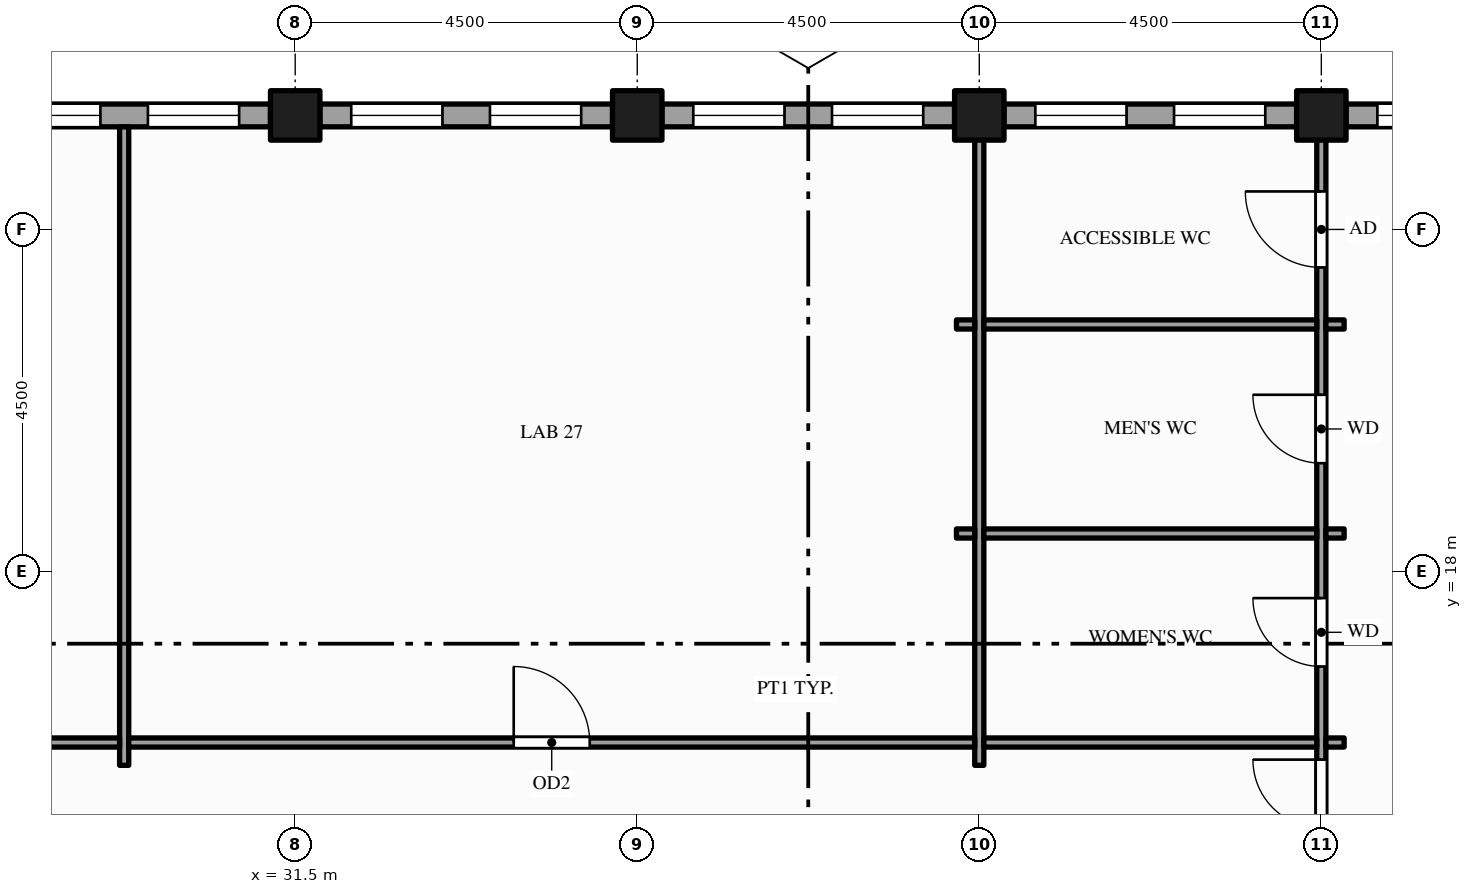
"""IFC4 building model, lengths in metres.
Left out: names, types, materials, properties, quantities, classifications, styles, units other than length and angle.
Written with IfcOpenShell. Run it as: python <this file> out.ifc"""

import sys

from ifc_helpers import new_model, si_unit, direction, frame, frame_2d, origin, origin_2d, place, context, subcontext, project, spatial, rectangle, hollow_rectangle, extrude, element, fill, save


model = new_model("IFC4")
c1 = context("Model", 3, precision=1e-05, world=origin(), true_north=direction((0.0, 1.0)))
c2 = subcontext(c1, "Body", "Model", "MODEL_VIEW")
j1 = project(units=[si_unit("LENGTHUNIT", "METRE"), si_unit("PLANEANGLEUNIT", "RADIAN")], contexts=[c1])
p1 = place(None, origin())
s1 = spatial("IfcSite", under=j1, at=p1, CompositionType="ELEMENT")
p2 = place(p1, origin())
s2 = spatial("IfcBuilding", under=s1, at=p2, CompositionType="ELEMENT")
p3 = place(p2, frame((0.0, 0.0, 285.0)))
s3 = spatial("IfcBuildingStorey", under=s2, at=p3, CompositionType="ELEMENT", Elevation=285.0)
for number, where, z_axis, x_axis in (
    (1, (31.5, 24.0, -0.15), (0.0, 0.0, 1.0), (1.0, 0.0, 0.0)),
    (2, (36.0, 24.0, -0.15), (0.0, 0.0, 1.0), (1.0, 0.0, 0.0)),
    (3, (40.5, 24.0, -0.15), (0.0, 0.0, 1.0), (1.0, 0.0, 0.0)),
    (4, (45.0, 24.0, -0.15), (0.0, 0.0, 1.0), (1.0, 0.0, 0.0)),
):
    element("IfcColumn", number, at=place(p3, frame(where, z_axis=z_axis, x_axis=x_axis)), inside=s3, PredefinedType="COLUMN", context=c2, shape_type="SweptSolid", body=[
        extrude(hollow_rectangle(XDim=0.65, YDim=0.65, WallThickness=0.032, at=origin_2d()), origin(), (0.0, 0.0, 1.0), 4.0),
    ])
p4 = place(p3, frame((49.175, 24.0, 0.0), z_axis=(0.0, 0.0, 1.0), x_axis=(-1.0, 0.0, 0.0)))
e5 = element("IfcWall", 5, at=p4, inside=s3, PredefinedType="STANDARD", context=c2, shape_type="SweptSolid", body=[
    extrude(rectangle(XDim=3.85, YDim=0.3, at=frame_2d((1.925, 0.0))), origin(), (0.0, 0.0, 1.0), 2.87),
])
p5 = place(p4, frame((0.413, 0.0, 0.9)))
e6 = element("IfcOpeningElement", 6, at=p5, cuts=e5, PredefinedType="OPENING", context=c2, shape_type="SweptSolid", body=[
    extrude(rectangle(XDim=1.2, YDim=1.75, at=frame_2d((0.6, 0.875))), frame((0.0, 0.16, 0.0), z_axis=(0.0, -1.0, 0.0), x_axis=(1.0, 0.0, 0.0)), (0.0, 0.0, 1.0), 0.32),
])
p6 = place(p4, frame((2.238, 0.0, 0.9)))
e7 = element("IfcOpeningElement", 7, at=p6, cuts=e5, PredefinedType="OPENING", context=c2, shape_type="SweptSolid", body=[
    extrude(rectangle(XDim=1.2, YDim=1.75, at=frame_2d((0.6, 0.875))), frame((0.0, 0.16, 0.0), z_axis=(0.0, -1.0, 0.0), x_axis=(1.0, 0.0, 0.0)), (0.0, 0.0, 1.0), 0.32),
])
p7 = place(p3, frame((44.675, 24.0, 0.0), z_axis=(0.0, 0.0, 1.0), x_axis=(-1.0, 0.0, 0.0)))
e8 = element("IfcWall", 8, at=p7, inside=s3, PredefinedType="STANDARD", context=c2, shape_type="SweptSolid", body=[
    extrude(rectangle(XDim=3.85, YDim=0.3, at=frame_2d((1.925, 0.0))), origin(), (0.0, 0.0, 1.0), 2.87),
])
p8 = place(p7, frame((0.413, 0.0, 0.9)))
e9 = element("IfcOpeningElement", 9, at=p8, cuts=e8, PredefinedType="OPENING", context=c2, shape_type="SweptSolid", body=[
    extrude(rectangle(XDim=1.2, YDim=1.75, at=frame_2d((0.6, 0.875))), frame((0.0, 0.16, 0.0), z_axis=(0.0, -1.0, 0.0), x_axis=(1.0, 0.0, 0.0)), (0.0, 0.0, 1.0), 0.32),
])
p9 = place(p7, frame((2.238, 0.0, 0.9)))
e10 = element("IfcOpeningElement", 10, at=p9, cuts=e8, PredefinedType="OPENING", context=c2, shape_type="SweptSolid", body=[
    extrude(rectangle(XDim=1.2, YDim=1.75, at=frame_2d((0.6, 0.875))), frame((0.0, 0.16, 0.0), z_axis=(0.0, -1.0, 0.0), x_axis=(1.0, 0.0, 0.0)), (0.0, 0.0, 1.0), 0.32),
])
p10 = place(p3, frame((40.175, 24.0, 0.0), z_axis=(0.0, 0.0, 1.0), x_axis=(-1.0, 0.0, 0.0)))
e11 = element("IfcWall", 11, at=p10, inside=s3, PredefinedType="STANDARD", context=c2, shape_type="SweptSolid", body=[
    extrude(rectangle(XDim=3.85, YDim=0.3, at=frame_2d((1.925, 0.0))), origin(), (0.0, 0.0, 1.0), 2.87),
])
p11 = place(p10, frame((0.413, 0.0, 0.9)))
e12 = element("IfcOpeningElement", 12, at=p11, cuts=e11, PredefinedType="OPENING", context=c2, shape_type="SweptSolid", body=[
    extrude(rectangle(XDim=1.2, YDim=1.75, at=frame_2d((0.6, 0.875))), frame((0.0, 0.16, 0.0), z_axis=(0.0, -1.0, 0.0), x_axis=(1.0, 0.0, 0.0)), (0.0, 0.0, 1.0), 0.32),
])
p12 = place(p10, frame((2.238, 0.0, 0.9)))
e13 = element("IfcOpeningElement", 13, at=p12, cuts=e11, PredefinedType="OPENING", context=c2, shape_type="SweptSolid", body=[
    extrude(rectangle(XDim=1.2, YDim=1.75, at=frame_2d((0.6, 0.875))), frame((0.0, 0.16, 0.0), z_axis=(0.0, -1.0, 0.0), x_axis=(1.0, 0.0, 0.0)), (0.0, 0.0, 1.0), 0.32),
])
p13 = place(p3, frame((35.675, 24.0, 0.0), z_axis=(0.0, 0.0, 1.0), x_axis=(-1.0, 0.0, 0.0)))
e14 = element("IfcWall", 14, at=p13, inside=s3, PredefinedType="STANDARD", context=c2, shape_type="SweptSolid", body=[
    extrude(rectangle(XDim=3.85, YDim=0.3, at=frame_2d((1.925, 0.0))), origin(), (0.0, 0.0, 1.0), 2.87),
])
p14 = place(p13, frame((0.413, 0.0, 0.9)))
e15 = element("IfcOpeningElement", 15, at=p14, cuts=e14, PredefinedType="OPENING", context=c2, shape_type="SweptSolid", body=[
    extrude(rectangle(XDim=1.2, YDim=1.75, at=frame_2d((0.6, 0.875))), frame((0.0, 0.16, 0.0), z_axis=(0.0, -1.0, 0.0), x_axis=(1.0, 0.0, 0.0)), (0.0, 0.0, 1.0), 0.32),
])
p15 = place(p13, frame((2.238, 0.0, 0.9)))
e16 = element("IfcOpeningElement", 16, at=p15, cuts=e14, PredefinedType="OPENING", context=c2, shape_type="SweptSolid", body=[
    extrude(rectangle(XDim=1.2, YDim=1.75, at=frame_2d((0.6, 0.875))), frame((0.0, 0.16, 0.0), z_axis=(0.0, -1.0, 0.0), x_axis=(1.0, 0.0, 0.0)), (0.0, 0.0, 1.0), 0.32),
])
p16 = place(p3, frame((31.175, 24.0, 0.0), z_axis=(0.0, 0.0, 1.0), x_axis=(-1.0, 0.0, 0.0)))
e17 = element("IfcWall", 17, at=p16, inside=s3, PredefinedType="STANDARD", context=c2, shape_type="SweptSolid", body=[
    extrude(rectangle(XDim=3.85, YDim=0.3, at=frame_2d((1.925, 0.0))), origin(), (0.0, 0.0, 1.0), 2.87),
])
p17 = place(p16, frame((0.413, 0.0, 0.9)))
e18 = element("IfcOpeningElement", 18, at=p17, cuts=e17, PredefinedType="OPENING", context=c2, shape_type="SweptSolid", body=[
    extrude(rectangle(XDim=1.2, YDim=1.75, at=frame_2d((0.6, 0.875))), frame((0.0, 0.16, 0.0), z_axis=(0.0, -1.0, 0.0), x_axis=(1.0, 0.0, 0.0)), (0.0, 0.0, 1.0), 0.32),
])
p18 = place(p16, frame((2.238, 0.0, 0.9)))
e19 = element("IfcOpeningElement", 19, at=p18, cuts=e17, PredefinedType="OPENING", context=c2, shape_type="SweptSolid", body=[
    extrude(rectangle(XDim=1.2, YDim=1.75, at=frame_2d((0.6, 0.875))), frame((0.0, 0.16, 0.0), z_axis=(0.0, -1.0, 0.0), x_axis=(1.0, 0.0, 0.0)), (0.0, 0.0, 1.0), 0.32),
])
for number, where, z_axis, x_axis in (
    (20, (29.25, 15.45, 0.0), (0.0, 0.0, 1.0), (0.0, 1.0, 0.0)),
    (21, (40.5, 15.45, 0.0), (0.0, 0.0, 1.0), (0.0, 1.0, 0.0)),
):
    element("IfcWall", number, at=place(p3, frame(where, z_axis=z_axis, x_axis=x_axis)), inside=s3, PredefinedType="PARTITIONING", context=c2, shape_type="SweptSolid", body=[
        extrude(rectangle(XDim=8.4, YDim=0.12, at=frame_2d((4.2, 0.0))), origin(), (0.0, 0.0, 1.0), 2.87),
    ])
p19 = place(p3, frame((45.0, 1.65, 0.0), z_axis=(0.0, 0.0, 1.0), x_axis=(0.0, 1.0, 0.0)))
e22 = element("IfcWall", 22, at=p19, inside=s3, PredefinedType="PARTITIONING", context=c2, shape_type="SweptSolid", body=[
    extrude(rectangle(XDim=22.2, YDim=0.12, at=frame_2d((11.1, 0.0))), origin(), (0.0, 0.0, 1.0), 2.87),
])
p20 = place(p19, frame((12.075, 0.0, 0.0)))
e23 = element("IfcOpeningElement", 23, at=p20, cuts=e22, PredefinedType="OPENING", context=c2, shape_type="SweptSolid", body=[
    extrude(rectangle(XDim=1.8, YDim=2.1, at=frame_2d((0.9, 1.05))), frame((0.0, 0.07, 0.0), z_axis=(0.0, -1.0, 0.0), x_axis=(1.0, 0.0, 0.0)), (0.0, 0.0, 1.0), 0.14),
])
p21 = place(p19, frame((15.1, 0.0, 0.0)))
e24 = element("IfcOpeningElement", 24, at=p21, cuts=e22, PredefinedType="OPENING", context=c2, shape_type="SweptSolid", body=[
    extrude(rectangle(XDim=0.9, YDim=2.1, at=frame_2d((0.45, 1.05))), frame((0.0, 0.07, 0.0), z_axis=(0.0, -1.0, 0.0), x_axis=(1.0, 0.0, 0.0)), (0.0, 0.0, 1.0), 0.14),
])
p22 = place(p19, frame((17.775, 0.0, 0.0)))
e25 = element("IfcOpeningElement", 25, at=p22, cuts=e22, PredefinedType="OPENING", context=c2, shape_type="SweptSolid", body=[
    extrude(rectangle(XDim=0.9, YDim=2.1, at=frame_2d((0.45, 1.05))), frame((0.0, 0.07, 0.0), z_axis=(0.0, -1.0, 0.0), x_axis=(1.0, 0.0, 0.0)), (0.0, 0.0, 1.0), 0.14),
])
p23 = place(p19, frame((20.35, 0.0, 0.0)))
e26 = element("IfcOpeningElement", 26, at=p23, cuts=e22, PredefinedType="OPENING", context=c2, shape_type="SweptSolid", body=[
    extrude(rectangle(XDim=1.0, YDim=2.1, at=frame_2d((0.5, 1.05))), frame((0.0, 0.07, 0.0), z_axis=(0.0, -1.0, 0.0), x_axis=(1.0, 0.0, 0.0)), (0.0, 0.0, 1.0), 0.14),
])
p24 = place(p3, frame((24.81, 15.75, 0.0), z_axis=(0.0, 0.0, 1.0), x_axis=(1.0, 0.0, 0.0)))
e27 = element("IfcWall", 27, at=p24, inside=s3, PredefinedType="PARTITIONING", context=c2, shape_type="SweptSolid", body=[
    extrude(rectangle(XDim=4.38, YDim=0.12, at=frame_2d((2.19, 0.0))), origin(), (0.0, 0.0, 1.0), 2.87),
])
p25 = place(p24, frame((1.69, 0.0, 0.0)))
e28 = element("IfcOpeningElement", 28, at=p25, cuts=e27, PredefinedType="OPENING", context=c2, shape_type="SweptSolid", body=[
    extrude(rectangle(XDim=1.0, YDim=2.1, at=frame_2d((0.5, 1.05))), frame((0.0, 0.07, 0.0), z_axis=(0.0, -1.0, 0.0), x_axis=(1.0, 0.0, 0.0)), (0.0, 0.0, 1.0), 0.14),
])
p26 = place(p3, frame((29.31, 15.75, 0.0), z_axis=(0.0, 0.0, 1.0), x_axis=(1.0, 0.0, 0.0)))
e29 = element("IfcWall", 29, at=p26, inside=s3, PredefinedType="PARTITIONING", context=c2, shape_type="SweptSolid", body=[
    extrude(rectangle(XDim=11.13, YDim=0.12, at=frame_2d((5.565, 0.0))), origin(), (0.0, 0.0, 1.0), 2.87),
])
p27 = place(p26, frame((5.065, 0.0, 0.0)))
e30 = element("IfcOpeningElement", 30, at=p27, cuts=e29, PredefinedType="OPENING", context=c2, shape_type="SweptSolid", body=[
    extrude(rectangle(XDim=1.0, YDim=2.1, at=frame_2d((0.5, 1.05))), frame((0.0, 0.07, 0.0), z_axis=(0.0, -1.0, 0.0), x_axis=(1.0, 0.0, 0.0)), (0.0, 0.0, 1.0), 0.14),
])
p28 = place(p3, frame((40.56, 15.75, 0.0), z_axis=(0.0, 0.0, 1.0), x_axis=(1.0, 0.0, 0.0)))
e31 = element("IfcWall", 31, at=p28, inside=s3, PredefinedType="PARTITIONING", context=c2, shape_type="SweptSolid", body=[
    extrude(rectangle(XDim=4.38, YDim=0.12, at=frame_2d((2.19, 0.0))), origin(), (0.0, 0.0, 1.0), 2.87),
])
for number, where, z_axis, x_axis in (
    (32, (45.06, 15.75, 0.0), (0.0, 0.0, 1.0), (1.0, 0.0, 0.0)),
    (33, (40.2, 18.5, 0.0), (0.0, 0.0, 1.0), (1.0, 0.0, 0.0)),
):
    element("IfcWall", number, at=place(p3, frame(where, z_axis=z_axis, x_axis=x_axis)), inside=s3, PredefinedType="PARTITIONING", context=c2, shape_type="SweptSolid", body=[
        extrude(rectangle(XDim=0.24, YDim=0.12, at=frame_2d((0.12, 0.0))), origin(), (0.0, 0.0, 1.0), 2.87),
    ])
p29 = place(p3, frame((40.56, 18.5, 0.0), z_axis=(0.0, 0.0, 1.0), x_axis=(1.0, 0.0, 0.0)))
e34 = element("IfcWall", 34, at=p29, inside=s3, PredefinedType="PARTITIONING", context=c2, shape_type="SweptSolid", body=[
    extrude(rectangle(XDim=4.38, YDim=0.12, at=frame_2d((2.19, 0.0))), origin(), (0.0, 0.0, 1.0), 2.87),
])
for number, where, z_axis, x_axis in (
    (35, (45.06, 18.5, 0.0), (0.0, 0.0, 1.0), (1.0, 0.0, 0.0)),
    (36, (40.2, 21.25, 0.0), (0.0, 0.0, 1.0), (1.0, 0.0, 0.0)),
):
    element("IfcWall", number, at=place(p3, frame(where, z_axis=z_axis, x_axis=x_axis)), inside=s3, PredefinedType="PARTITIONING", context=c2, shape_type="SweptSolid", body=[
        extrude(rectangle(XDim=0.24, YDim=0.12, at=frame_2d((0.12, 0.0))), origin(), (0.0, 0.0, 1.0), 2.87),
    ])
p30 = place(p3, frame((40.56, 21.25, 0.0), z_axis=(0.0, 0.0, 1.0), x_axis=(1.0, 0.0, 0.0)))
e37 = element("IfcWall", 37, at=p30, inside=s3, PredefinedType="PARTITIONING", context=c2, shape_type="SweptSolid", body=[
    extrude(rectangle(XDim=4.38, YDim=0.12, at=frame_2d((2.19, 0.0))), origin(), (0.0, 0.0, 1.0), 2.87),
])
p31 = place(p3, frame((45.06, 21.25, 0.0), z_axis=(0.0, 0.0, 1.0), x_axis=(1.0, 0.0, 0.0)))
e38 = element("IfcWall", 38, at=p31, inside=s3, PredefinedType="PARTITIONING", context=c2, shape_type="SweptSolid", body=[
    extrude(rectangle(XDim=0.24, YDim=0.12, at=frame_2d((0.12, 0.0))), origin(), (0.0, 0.0, 1.0), 2.87),
])
p32 = place(p6, origin())
e39 = element("IfcWindow", 39, at=p32, inside=s3, PartitioningType="SINGLE_PANEL", PredefinedType="WINDOW", context=c2, shape_type="SweptSolid", body=[
    extrude(rectangle(XDim=1.2, YDim=1.75, at=frame_2d((0.6, 0.875))), frame((0.0, 0.03, 0.0), z_axis=(0.0, -1.0, 0.0), x_axis=(1.0, 0.0, 0.0)), (0.0, 0.0, 1.0), 0.06),
])
fill(e7, e39)
p33 = place(p8, origin())
e40 = element("IfcWindow", 40, at=p33, inside=s3, PartitioningType="SINGLE_PANEL", PredefinedType="WINDOW", context=c2, shape_type="SweptSolid", body=[
    extrude(rectangle(XDim=1.2, YDim=1.75, at=frame_2d((0.6, 0.875))), frame((0.0, 0.03, 0.0), z_axis=(0.0, -1.0, 0.0), x_axis=(1.0, 0.0, 0.0)), (0.0, 0.0, 1.0), 0.06),
])
fill(e9, e40)
p34 = place(p9, origin())
e41 = element("IfcWindow", 41, at=p34, inside=s3, PartitioningType="SINGLE_PANEL", PredefinedType="WINDOW", context=c2, shape_type="SweptSolid", body=[
    extrude(rectangle(XDim=1.2, YDim=1.75, at=frame_2d((0.6, 0.875))), frame((0.0, 0.03, 0.0), z_axis=(0.0, -1.0, 0.0), x_axis=(1.0, 0.0, 0.0)), (0.0, 0.0, 1.0), 0.06),
])
fill(e10, e41)
p35 = place(p11, origin())
e42 = element("IfcWindow", 42, at=p35, inside=s3, PartitioningType="SINGLE_PANEL", PredefinedType="WINDOW", context=c2, shape_type="SweptSolid", body=[
    extrude(rectangle(XDim=1.2, YDim=1.75, at=frame_2d((0.6, 0.875))), frame((0.0, 0.03, 0.0), z_axis=(0.0, -1.0, 0.0), x_axis=(1.0, 0.0, 0.0)), (0.0, 0.0, 1.0), 0.06),
])
fill(e12, e42)
p36 = place(p12, origin())
e43 = element("IfcWindow", 43, at=p36, inside=s3, PartitioningType="SINGLE_PANEL", PredefinedType="WINDOW", context=c2, shape_type="SweptSolid", body=[
    extrude(rectangle(XDim=1.2, YDim=1.75, at=frame_2d((0.6, 0.875))), frame((0.0, 0.03, 0.0), z_axis=(0.0, -1.0, 0.0), x_axis=(1.0, 0.0, 0.0)), (0.0, 0.0, 1.0), 0.06),
])
fill(e13, e43)
p37 = place(p14, origin())
e44 = element("IfcWindow", 44, at=p37, inside=s3, PartitioningType="SINGLE_PANEL", PredefinedType="WINDOW", context=c2, shape_type="SweptSolid", body=[
    extrude(rectangle(XDim=1.2, YDim=1.75, at=frame_2d((0.6, 0.875))), frame((0.0, 0.03, 0.0), z_axis=(0.0, -1.0, 0.0), x_axis=(1.0, 0.0, 0.0)), (0.0, 0.0, 1.0), 0.06),
])
fill(e15, e44)
p38 = place(p15, origin())
e45 = element("IfcWindow", 45, at=p38, inside=s3, PartitioningType="SINGLE_PANEL", PredefinedType="WINDOW", context=c2, shape_type="SweptSolid", body=[
    extrude(rectangle(XDim=1.2, YDim=1.75, at=frame_2d((0.6, 0.875))), frame((0.0, 0.03, 0.0), z_axis=(0.0, -1.0, 0.0), x_axis=(1.0, 0.0, 0.0)), (0.0, 0.0, 1.0), 0.06),
])
fill(e16, e45)
p39 = place(p17, origin())
e46 = element("IfcWindow", 46, at=p39, inside=s3, PartitioningType="SINGLE_PANEL", PredefinedType="WINDOW", context=c2, shape_type="SweptSolid", body=[
    extrude(rectangle(XDim=1.2, YDim=1.75, at=frame_2d((0.6, 0.875))), frame((0.0, 0.03, 0.0), z_axis=(0.0, -1.0, 0.0), x_axis=(1.0, 0.0, 0.0)), (0.0, 0.0, 1.0), 0.06),
])
fill(e18, e46)
p40 = place(p18, origin())
e47 = element("IfcWindow", 47, at=p40, inside=s3, PartitioningType="SINGLE_PANEL", PredefinedType="WINDOW", context=c2, shape_type="SweptSolid", body=[
    extrude(rectangle(XDim=1.2, YDim=1.75, at=frame_2d((0.6, 0.875))), frame((0.0, 0.03, 0.0), z_axis=(0.0, -1.0, 0.0), x_axis=(1.0, 0.0, 0.0)), (0.0, 0.0, 1.0), 0.06),
])
fill(e19, e47)
p41 = place(p20, origin())
e48 = element("IfcDoor", 48, at=p41, inside=s3, OperationType="DOUBLE_DOOR_SINGLE_SWING", PredefinedType="DOOR", context=c2, shape_type="SweptSolid", body=[
    extrude(rectangle(XDim=1.8, YDim=2.1, at=frame_2d((0.9, 1.05))), frame((0.0, 0.025, 0.0), z_axis=(0.0, -1.0, 0.0), x_axis=(1.0, 0.0, 0.0)), (0.0, 0.0, 1.0), 0.05),
])
fill(e23, e48)
p42 = place(p27, origin())
e49 = element("IfcDoor", 49, at=p42, inside=s3, OperationType="SINGLE_SWING_LEFT", PredefinedType="DOOR", context=c2, shape_type="SweptSolid", body=[
    extrude(rectangle(XDim=1.0, YDim=2.1, at=frame_2d((0.5, 1.05))), frame((0.0, 0.025, 0.0), z_axis=(0.0, -1.0, 0.0), x_axis=(1.0, 0.0, 0.0)), (0.0, 0.0, 1.0), 0.05),
])
fill(e30, e49)
p43 = place(p21, origin())
e50 = element("IfcDoor", 50, at=p43, inside=s3, OperationType="SINGLE_SWING_RIGHT", PredefinedType="DOOR", context=c2, shape_type="SweptSolid", body=[
    extrude(rectangle(XDim=0.9, YDim=2.1, at=frame_2d((0.45, 1.05))), frame((0.0, 0.025, 0.0), z_axis=(0.0, -1.0, 0.0), x_axis=(1.0, 0.0, 0.0)), (0.0, 0.0, 1.0), 0.05),
])
fill(e24, e50)
p44 = place(p22, origin())
e51 = element("IfcDoor", 51, at=p44, inside=s3, OperationType="SINGLE_SWING_RIGHT", PredefinedType="DOOR", context=c2, shape_type="SweptSolid", body=[
    extrude(rectangle(XDim=0.9, YDim=2.1, at=frame_2d((0.45, 1.05))), frame((0.0, 0.025, 0.0), z_axis=(0.0, -1.0, 0.0), x_axis=(1.0, 0.0, 0.0)), (0.0, 0.0, 1.0), 0.05),
])
fill(e25, e51)
p45 = place(p23, origin())
e52 = element("IfcDoor", 52, at=p45, inside=s3, OperationType="SINGLE_SWING_RIGHT", PredefinedType="DOOR", context=c2, shape_type="SweptSolid", body=[
    extrude(rectangle(XDim=1.0, YDim=2.1, at=frame_2d((0.5, 1.05))), frame((0.0, 0.025, 0.0), z_axis=(0.0, -1.0, 0.0), x_axis=(1.0, 0.0, 0.0)), (0.0, 0.0, 1.0), 0.05),
])
fill(e26, e52)
save(model, sys.argv[1])
